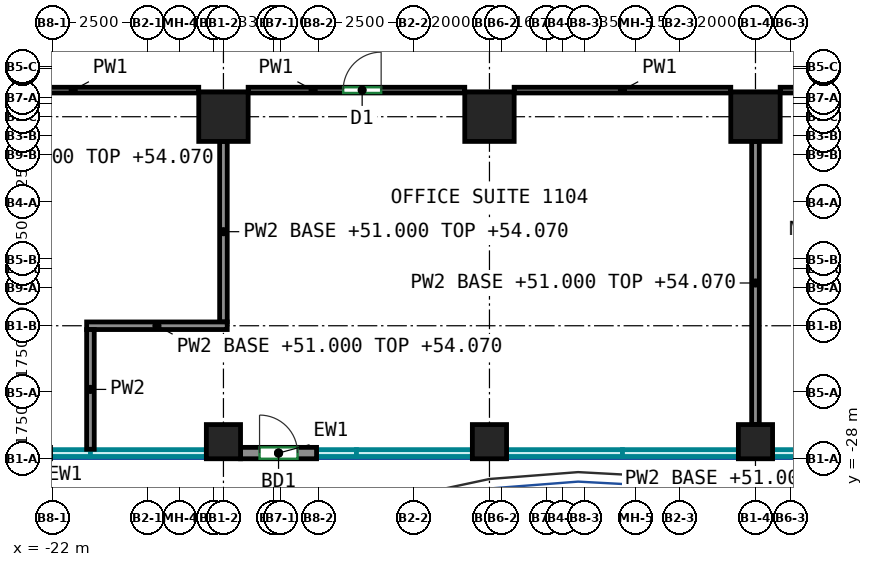
"""IFC4 building model, lengths in metres.
Left out: names, types, materials, properties, quantities, classifications, styles, units other than length and angle.
Written with IfcOpenShell. Run it as: python <this file> out.ifc"""

import sys

from ifc_helpers import new_model, si_unit, direction, frame, frame_2d, origin, origin_2d, place, context, subcontext, project, spatial, rectangle, extrude, source, transform, mapped, element, fill, save


model = new_model("IFC4")
c1 = context("Model", 3, precision=1e-05, world=origin(), true_north=direction((0.0, 1.0)))
c2 = subcontext(c1, "Body", "Model", "MODEL_VIEW")
j1 = project(units=[si_unit("LENGTHUNIT", "METRE"), si_unit("PLANEANGLEUNIT", "RADIAN")], contexts=[c1])
p1 = place(None, origin())
s1 = spatial("IfcSite", under=j1, at=p1, CompositionType="ELEMENT")
p2 = place(p1, origin())
s2 = spatial("IfcBuilding", under=s1, at=p2, CompositionType="ELEMENT")
p3 = place(p2, frame((0.0, 0.0, 51.0)))
s3 = spatial("IfcBuildingStorey", under=s2, at=p3, CompositionType="ELEMENT", Elevation=51.0)
m1 = source(origin(), c2, "Body", "SweptSolid", [
    extrude(rectangle(XDim=0.9, YDim=0.9, at=origin_2d()), origin(), (0.0, 0.0, 1.0), 3.72),
])
p4 = place(p3, frame((-17.5, -27.55, 0.0), z_axis=(0.0, 0.0, 1.0), x_axis=(1.0, 0.0, 0.0)))
e1 = element("IfcColumn", 1, at=p4, inside=s3, PredefinedType="COLUMN", context=c2, shape_type="MappedRepresentation", body=[
    mapped(m1, transform((0.0, 0.0, 0.0))),
])
m2 = source(origin(), c2, "Body", "SweptSolid", [
    extrude(rectangle(XDim=1.3, YDim=1.3, at=origin_2d()), origin(), (0.0, 0.0, 1.0), 3.72),
])
p5 = place(p3, frame((-17.5, -19.0, 0.0), z_axis=(0.0, 0.0, 1.0), x_axis=(1.0, 0.0, 0.0)))
e2 = element("IfcColumn", 2, at=p5, inside=s3, PredefinedType="COLUMN", context=c2, shape_type="MappedRepresentation", body=[
    mapped(m2, transform((0.0, 0.0, 0.0))),
])
p6 = place(p3, frame((-10.5, -27.55, 0.0), z_axis=(0.0, 0.0, 1.0), x_axis=(1.0, 0.0, 0.0)))
e3 = element("IfcColumn", 3, at=p6, inside=s3, PredefinedType="COLUMN", context=c2, shape_type="MappedRepresentation", body=[
    mapped(m1, transform((0.0, 0.0, 0.0))),
])
p7 = place(p3, frame((-10.5, -19.0, 0.0), z_axis=(0.0, 0.0, 1.0), x_axis=(1.0, 0.0, 0.0)))
e4 = element("IfcColumn", 4, at=p7, inside=s3, PredefinedType="COLUMN", context=c2, shape_type="MappedRepresentation", body=[
    mapped(m2, transform((0.0, 0.0, 0.0))),
])
p8 = place(p3, frame((-3.5, -27.55, 0.0), z_axis=(0.0, 0.0, 1.0), x_axis=(1.0, 0.0, 0.0)))
e5 = element("IfcColumn", 5, at=p8, inside=s3, PredefinedType="COLUMN", context=c2, shape_type="MappedRepresentation", body=[
    mapped(m1, transform((0.0, 0.0, 0.0))),
])
p9 = place(p3, frame((-3.5, -19.0, 0.0), z_axis=(0.0, 0.0, 1.0), x_axis=(1.0, 0.0, 0.0)))
e6 = element("IfcColumn", 6, at=p9, inside=s3, PredefinedType="COLUMN", context=c2, shape_type="MappedRepresentation", body=[
    mapped(m2, transform((0.0, 0.0, 0.0))),
])
m3 = source(origin(), c2, "Body", "SweptSolid", [
    extrude(rectangle(XDim=2.0, YDim=0.3, at=frame_2d((1.0, 0.0))), origin(), (0.0, 0.0, 1.0), 3.72),
])
p10 = place(p3, frame((-17.05, -27.85, 0.0), z_axis=(0.0, 0.0, 1.0), x_axis=(1.0, 0.0, 0.0)))
e7 = element("IfcWall", 7, at=p10, inside=s3, PredefinedType="SOLIDWALL", context=c2, shape_type="MappedRepresentation", body=[
    mapped(m3, transform((0.0, 0.0, 0.0))),
])
p11 = place(p10, frame((0.5, 0.0, 0.0)))
e8 = element("IfcOpeningElement", 8, at=p11, cuts=e7, PredefinedType="OPENING", context=c2, shape_type="SweptSolid", body=[
    extrude(rectangle(XDim=1.0, YDim=2.1, at=frame_2d((0.5, 1.05))), frame((0.0, 0.16, 0.0), z_axis=(0.0, -1.0, 0.0), x_axis=(1.0, 0.0, 0.0)), (0.0, 0.0, 1.0), 0.32),
])
p12 = place(p3, frame((-24.757, -18.3, 0.0), z_axis=(0.0, 0.0, 1.0), x_axis=(1.0, 0.0, 0.0)))
e9 = element("IfcWall", 9, at=p12, inside=s3, PredefinedType="PARTITIONING", context=c2, shape_type="SweptSolid", body=[
    extrude(rectangle(XDim=6.607, YDim=0.15, at=frame_2d((3.304, 0.0))), origin(), (0.0, 0.0, 1.0), 3.72),
])
p13 = place(p3, frame((-16.85, -18.3, 0.0), z_axis=(0.0, 0.0, 1.0), x_axis=(1.0, 0.0, 0.0)))
e10 = element("IfcWall", 10, at=p13, inside=s3, PredefinedType="PARTITIONING", context=c2, shape_type="SweptSolid", body=[
    extrude(rectangle(XDim=5.7, YDim=0.15, at=frame_2d((2.85, 0.0))), origin(), (0.0, 0.0, 1.0), 3.72),
])
p14 = place(p13, frame((2.5, 0.0, 0.0)))
e11 = element("IfcOpeningElement", 11, at=p14, cuts=e10, PredefinedType="OPENING", context=c2, shape_type="SweptSolid", body=[
    extrude(rectangle(XDim=1.0, YDim=2.1, at=frame_2d((0.5, 1.05))), frame((0.0, 0.085, 0.0), z_axis=(0.0, -1.0, 0.0), x_axis=(1.0, 0.0, 0.0)), (0.0, 0.0, 1.0), 0.17),
])
p15 = place(p3, frame((-9.85, -18.3, 0.0), z_axis=(0.0, 0.0, 1.0), x_axis=(1.0, 0.0, 0.0)))
e12 = element("IfcWall", 12, at=p15, inside=s3, PredefinedType="PARTITIONING", context=c2, shape_type="SweptSolid", body=[
    extrude(rectangle(XDim=5.7, YDim=0.15, at=frame_2d((2.85, 0.0))), origin(), (0.0, 0.0, 1.0), 3.72),
])
p16 = place(p3, frame((-2.85, -18.3, 0.0), z_axis=(0.0, 0.0, 1.0), x_axis=(1.0, 0.0, 0.0)))
e13 = element("IfcWall", 13, at=p16, inside=s3, PredefinedType="PARTITIONING", context=c2, shape_type="SweptSolid", body=[
    extrude(rectangle(XDim=5.7, YDim=0.15, at=frame_2d((2.85, 0.0))), origin(), (0.0, 0.0, 1.0), 3.72),
])
p17 = place(p16, frame((1.837, 0.0, 0.0)))
e14 = element("IfcOpeningElement", 14, at=p17, cuts=e13, PredefinedType="OPENING", context=c2, shape_type="SweptSolid", body=[
    extrude(rectangle(XDim=0.9, YDim=2.1, at=frame_2d((0.45, 1.05))), frame((0.0, 0.085, 0.0), z_axis=(0.0, -1.0, 0.0), x_axis=(1.0, 0.0, 0.0)), (0.0, 0.0, 1.0), 0.17),
])
p18 = place(p3, frame((-17.5, -24.4, 0.0), z_axis=(0.0, 0.0, 1.0), x_axis=(0.0, 1.0, 0.0)))
e15 = element("IfcWall", 15, at=p18, inside=s3, PredefinedType="PARTITIONING", context=c2, shape_type="SweptSolid", body=[
    extrude(rectangle(XDim=4.75, YDim=0.2, at=frame_2d((2.375, 0.0))), origin(), (0.0, 0.0, 1.0), 3.07),
])
p19 = place(p3, frame((-21.1, -24.5, 0.0), z_axis=(0.0, 0.0, 1.0), x_axis=(1.0, 0.0, 0.0)))
e16 = element("IfcWall", 16, at=p19, inside=s3, PredefinedType="PARTITIONING", context=c2, shape_type="SweptSolid", body=[
    extrude(rectangle(XDim=3.7, YDim=0.2, at=frame_2d((1.85, 0.0))), origin(), (0.0, 0.0, 1.0), 3.07),
])
p20 = place(p3, frame((-21.0, -27.75, 0.0), z_axis=(0.0, 0.0, 1.0), x_axis=(0.0, 1.0, 0.0)))
e17 = element("IfcWall", 17, at=p20, inside=s3, PredefinedType="PARTITIONING", context=c2, shape_type="SweptSolid", body=[
    extrude(rectangle(XDim=3.15, YDim=0.2, at=frame_2d((1.575, 0.0))), origin(), (0.0, 0.0, 1.0), 3.72),
])
p21 = place(p3, frame((-3.5, -27.1, 0.0), z_axis=(0.0, 0.0, 1.0), x_axis=(0.0, 1.0, 0.0)))
e18 = element("IfcWall", 18, at=p21, inside=s3, PredefinedType="PARTITIONING", context=c2, shape_type="SweptSolid", body=[
    extrude(rectangle(XDim=7.45, YDim=0.2, at=frame_2d((3.725, 0.0))), origin(), (0.0, 0.0, 1.0), 3.07),
])
p22 = place(p11, origin())
e19 = element("IfcDoor", 19, at=p22, inside=s3, OperationType="SINGLE_SWING_LEFT", PredefinedType="DOOR", context=c2, shape_type="SweptSolid", body=[
    extrude(rectangle(XDim=1.0, YDim=2.1, at=frame_2d((0.5, 1.05))), frame((0.0, 0.025, 0.0), z_axis=(0.0, -1.0, 0.0), x_axis=(1.0, 0.0, 0.0)), (0.0, 0.0, 1.0), 0.05),
])
fill(e8, e19)
p23 = place(p14, origin())
e20 = element("IfcDoor", 20, at=p23, inside=s3, OperationType="SINGLE_SWING_RIGHT", PredefinedType="DOOR", context=c2, shape_type="SweptSolid", body=[
    extrude(rectangle(XDim=1.0, YDim=2.1, at=frame_2d((0.5, 1.05))), frame((0.0, 0.025, 0.0), z_axis=(0.0, -1.0, 0.0), x_axis=(1.0, 0.0, 0.0)), (0.0, 0.0, 1.0), 0.05),
])
fill(e11, e20)
save(model, sys.argv[1])
